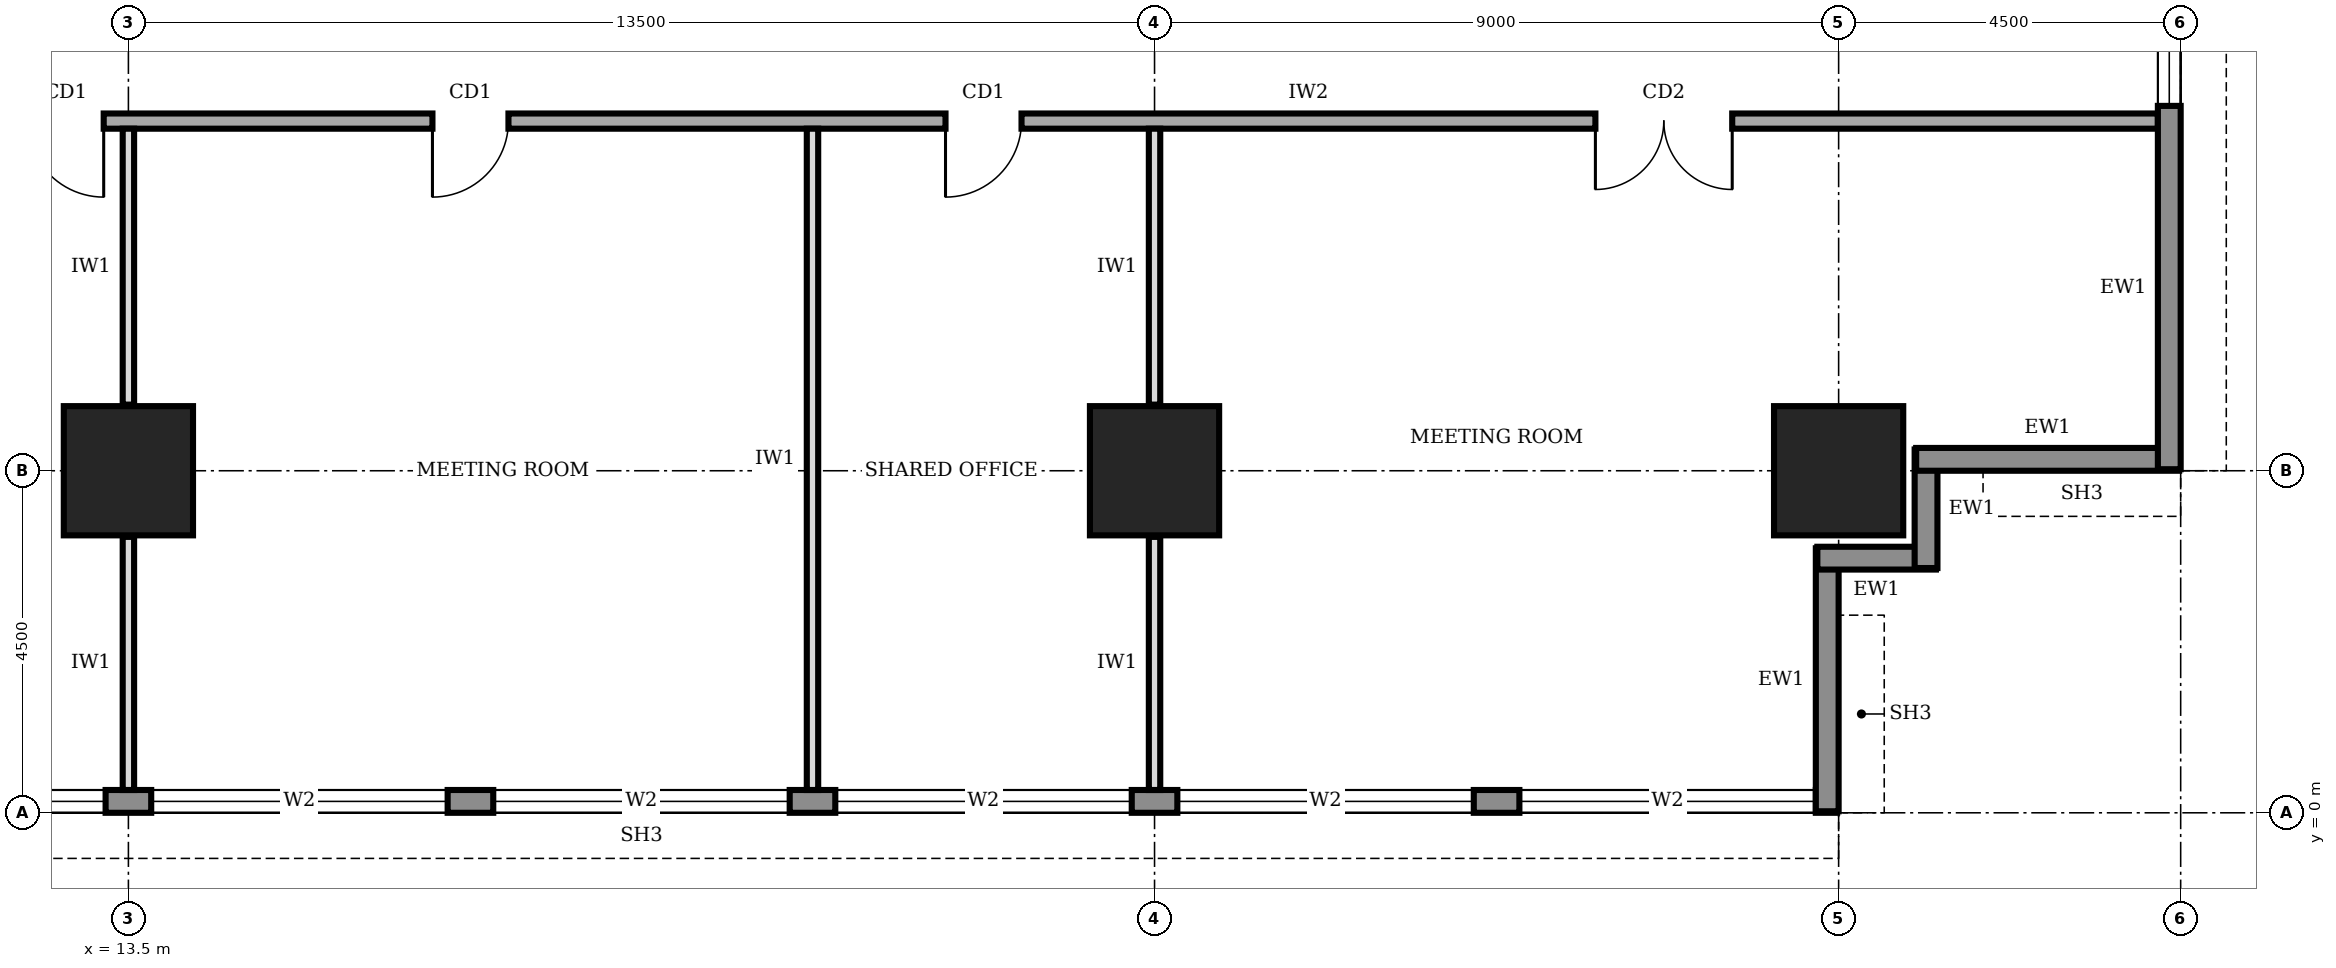
"""IFC4 building model, lengths in metres.
Left out: names, types, materials, properties, quantities, classifications, styles, units other than length and angle.
Written with IfcOpenShell. Run it as: python <this file> out.ifc"""

import sys

from ifc_helpers import new_model, si_unit, direction, frame, frame_2d, origin, origin_2d, place, context, subcontext, project, spatial, rectangle, extrude, element, fill, save


model = new_model("IFC4")
c1 = context("Model", 3, precision=1e-05, world=origin(), true_north=direction((0.0, 1.0)))
c2 = subcontext(c1, "Body", "Model", "MODEL_VIEW")
j1 = project(units=[si_unit("LENGTHUNIT", "METRE"), si_unit("PLANEANGLEUNIT", "RADIAN")], contexts=[c1])
p1 = place(None, origin())
s1 = spatial("IfcSite", under=j1, at=p1, CompositionType="ELEMENT")
p2 = place(p1, origin())
s2 = spatial("IfcBuilding", under=s1, at=p2, CompositionType="ELEMENT")
p3 = place(p2, frame((0.0, 0.0, 141.0)))
s3 = spatial("IfcBuildingStorey", under=s2, at=p3, CompositionType="ELEMENT", Elevation=141.0)
for number, where, z_axis, x_axis in (
    (1, (13.5, 4.5, 0.0), (0.0, 0.0, 1.0), (1.0, 0.0, 0.0)),
    (2, (27.0, 4.5, 0.0), (0.0, 0.0, 1.0), (1.0, 0.0, 0.0)),
    (3, (36.0, 4.5, 0.0), (0.0, 0.0, 1.0), (1.0, 0.0, 0.0)),
):
    element("IfcColumn", number, at=place(p3, frame(where, z_axis=z_axis, x_axis=x_axis)), inside=s3, PredefinedType="COLUMN", context=c2, shape_type="SweptSolid", body=[
        extrude(rectangle(XDim=1.7, YDim=1.7, at=origin_2d()), origin(), (0.0, 0.0, 1.0), 4.0),
    ])
p4 = place(p3, frame((4.52, 0.15, 0.0), z_axis=(0.0, 0.0, 1.0), x_axis=(1.0, 0.0, 0.0)))
e4 = element("IfcWall", 4, at=p4, inside=s3, PredefinedType="STANDARD", context=c2, shape_type="SweptSolid", body=[
    extrude(rectangle(XDim=31.46, YDim=0.3, at=frame_2d((15.73, 0.0))), origin(), (0.0, 0.0, 1.0), 3.75),
])
p5 = place(p4, frame((4.78, 0.0, 0.6)))
e5 = element("IfcOpeningElement", 5, at=p5, cuts=e4, PredefinedType="OPENING", context=c2, shape_type="SweptSolid", body=[
    extrude(rectangle(XDim=3.9, YDim=2.6, at=frame_2d((1.95, 1.3))), frame((0.0, 0.16, 0.0), z_axis=(0.0, -1.0, 0.0), x_axis=(1.0, 0.0, 0.0)), (0.0, 0.0, 1.0), 0.32),
])
p6 = place(p4, frame((9.28, 0.0, 0.6)))
e6 = element("IfcOpeningElement", 6, at=p6, cuts=e4, PredefinedType="OPENING", context=c2, shape_type="SweptSolid", body=[
    extrude(rectangle(XDim=3.9, YDim=2.6, at=frame_2d((1.95, 1.3))), frame((0.0, 0.16, 0.0), z_axis=(0.0, -1.0, 0.0), x_axis=(1.0, 0.0, 0.0)), (0.0, 0.0, 1.0), 0.32),
])
p7 = place(p4, frame((13.78, 0.0, 0.6)))
e7 = element("IfcOpeningElement", 7, at=p7, cuts=e4, PredefinedType="OPENING", context=c2, shape_type="SweptSolid", body=[
    extrude(rectangle(XDim=3.9, YDim=2.6, at=frame_2d((1.95, 1.3))), frame((0.0, 0.16, 0.0), z_axis=(0.0, -1.0, 0.0), x_axis=(1.0, 0.0, 0.0)), (0.0, 0.0, 1.0), 0.32),
])
p8 = place(p4, frame((18.28, 0.0, 0.6)))
e8 = element("IfcOpeningElement", 8, at=p8, cuts=e4, PredefinedType="OPENING", context=c2, shape_type="SweptSolid", body=[
    extrude(rectangle(XDim=3.9, YDim=2.6, at=frame_2d((1.95, 1.3))), frame((0.0, 0.16, 0.0), z_axis=(0.0, -1.0, 0.0), x_axis=(1.0, 0.0, 0.0)), (0.0, 0.0, 1.0), 0.32),
])
p9 = place(p4, frame((22.78, 0.0, 0.6)))
e9 = element("IfcOpeningElement", 9, at=p9, cuts=e4, PredefinedType="OPENING", context=c2, shape_type="SweptSolid", body=[
    extrude(rectangle(XDim=3.9, YDim=2.6, at=frame_2d((1.95, 1.3))), frame((0.0, 0.16, 0.0), z_axis=(0.0, -1.0, 0.0), x_axis=(1.0, 0.0, 0.0)), (0.0, 0.0, 1.0), 0.32),
])
p10 = place(p4, frame((27.28, 0.0, 0.6)))
e10 = element("IfcOpeningElement", 10, at=p10, cuts=e4, PredefinedType="OPENING", context=c2, shape_type="SweptSolid", body=[
    extrude(rectangle(XDim=3.9, YDim=2.6, at=frame_2d((1.95, 1.3))), frame((0.0, 0.16, 0.0), z_axis=(0.0, -1.0, 0.0), x_axis=(1.0, 0.0, 0.0)), (0.0, 0.0, 1.0), 0.32),
])
p11 = place(p3, frame((35.85, 0.02, 0.0), z_axis=(0.0, 0.0, 1.0), x_axis=(0.0, 1.0, 0.0)))
e11 = element("IfcWall", 11, at=p11, inside=s3, PredefinedType="STANDARD", context=c2, shape_type="SweptSolid", body=[
    extrude(rectangle(XDim=3.46, YDim=0.3, at=frame_2d((1.73, 0.0))), origin(), (0.0, 0.0, 1.0), 2.85),
])
for number, where, z_axis, x_axis in (
    (12, (35.72, 3.35, 0.0), (0.0, 0.0, 1.0), (1.0, 0.0, 0.0)),
    (13, (37.15, 3.22, 0.0), (0.0, 0.0, 1.0), (0.0, 1.0, 0.0)),
):
    element("IfcWall", number, at=place(p3, frame(where, z_axis=z_axis, x_axis=x_axis)), inside=s3, PredefinedType="STANDARD", context=c2, shape_type="SweptSolid", body=[
        extrude(rectangle(XDim=1.56, YDim=0.3, at=frame_2d((0.78, 0.0))), origin(), (0.0, 0.0, 1.0), 3.75),
    ])
p12 = place(p3, frame((37.02, 4.65, 0.0), z_axis=(0.0, 0.0, 1.0), x_axis=(1.0, 0.0, 0.0)))
e14 = element("IfcWall", 14, at=p12, inside=s3, PredefinedType="STANDARD", context=c2, shape_type="SweptSolid", body=[
    extrude(rectangle(XDim=3.46, YDim=0.3, at=frame_2d((1.73, 0.0))), origin(), (0.0, 0.0, 1.0), 2.85),
])
p13 = place(p3, frame((40.35, 4.52, 0.0), z_axis=(0.0, 0.0, 1.0), x_axis=(0.0, 1.0, 0.0)))
e15 = element("IfcWall", 15, at=p13, inside=s3, PredefinedType="STANDARD", context=c2, shape_type="SweptSolid", body=[
    extrude(rectangle(XDim=31.46, YDim=0.3, at=frame_2d((15.73, 0.0))), origin(), (0.0, 0.0, 1.0), 3.75),
])
p14 = place(p13, frame((4.78, 0.0, 0.6)))
e16 = element("IfcOpeningElement", 16, at=p14, cuts=e15, PredefinedType="OPENING", context=c2, shape_type="SweptSolid", body=[
    extrude(rectangle(XDim=3.9, YDim=2.6, at=frame_2d((1.95, 1.3))), frame((0.0, 0.16, 0.0), z_axis=(0.0, -1.0, 0.0), x_axis=(1.0, 0.0, 0.0)), (0.0, 0.0, 1.0), 0.32),
])
p15 = place(p13, frame((9.28, 0.0, 0.6)))
e17 = element("IfcOpeningElement", 17, at=p15, cuts=e15, PredefinedType="OPENING", context=c2, shape_type="SweptSolid", body=[
    extrude(rectangle(XDim=3.9, YDim=2.6, at=frame_2d((1.95, 1.3))), frame((0.0, 0.16, 0.0), z_axis=(0.0, -1.0, 0.0), x_axis=(1.0, 0.0, 0.0)), (0.0, 0.0, 1.0), 0.32),
])
p16 = place(p13, frame((13.78, 0.0, 0.6)))
e18 = element("IfcOpeningElement", 18, at=p16, cuts=e15, PredefinedType="OPENING", context=c2, shape_type="SweptSolid", body=[
    extrude(rectangle(XDim=3.9, YDim=2.6, at=frame_2d((1.95, 1.3))), frame((0.0, 0.16, 0.0), z_axis=(0.0, -1.0, 0.0), x_axis=(1.0, 0.0, 0.0)), (0.0, 0.0, 1.0), 0.32),
])
p17 = place(p13, frame((18.28, 0.0, 0.6)))
e19 = element("IfcOpeningElement", 19, at=p17, cuts=e15, PredefinedType="OPENING", context=c2, shape_type="SweptSolid", body=[
    extrude(rectangle(XDim=3.9, YDim=2.6, at=frame_2d((1.95, 1.3))), frame((0.0, 0.16, 0.0), z_axis=(0.0, -1.0, 0.0), x_axis=(1.0, 0.0, 0.0)), (0.0, 0.0, 1.0), 0.32),
])
p18 = place(p13, frame((22.78, 0.0, 0.6)))
e20 = element("IfcOpeningElement", 20, at=p18, cuts=e15, PredefinedType="OPENING", context=c2, shape_type="SweptSolid", body=[
    extrude(rectangle(XDim=3.9, YDim=2.6, at=frame_2d((1.95, 1.3))), frame((0.0, 0.16, 0.0), z_axis=(0.0, -1.0, 0.0), x_axis=(1.0, 0.0, 0.0)), (0.0, 0.0, 1.0), 0.32),
])
p19 = place(p13, frame((27.28, 0.0, 0.6)))
e21 = element("IfcOpeningElement", 21, at=p19, cuts=e15, PredefinedType="OPENING", context=c2, shape_type="SweptSolid", body=[
    extrude(rectangle(XDim=3.9, YDim=2.6, at=frame_2d((1.95, 1.3))), frame((0.0, 0.16, 0.0), z_axis=(0.0, -1.0, 0.0), x_axis=(1.0, 0.0, 0.0)), (0.0, 0.0, 1.0), 0.32),
])
p20 = place(p3, frame((11.9, 9.1, 0.0), z_axis=(0.0, 0.0, 1.0), x_axis=(1.0, 0.0, 0.0)))
e22 = element("IfcWall", 22, at=p20, inside=s3, PredefinedType="SOLIDWALL", context=c2, shape_type="SweptSolid", body=[
    extrude(rectangle(XDim=28.3, YDim=0.2, at=frame_2d((14.15, 0.0))), origin(), (0.0, 0.0, 1.0), 3.75),
])
p21 = place(p20, frame((0.275, 0.0, 0.0)))
e23 = element("IfcOpeningElement", 23, at=p21, cuts=e22, PredefinedType="OPENING", context=c2, shape_type="SweptSolid", body=[
    extrude(rectangle(XDim=1.0, YDim=2.1, at=frame_2d((0.5, 1.05))), frame((0.0, 0.11, 0.0), z_axis=(0.0, -1.0, 0.0), x_axis=(1.0, 0.0, 0.0)), (0.0, 0.0, 1.0), 0.22),
])
p22 = place(p20, frame((5.6, 0.0, 0.0)))
e24 = element("IfcOpeningElement", 24, at=p22, cuts=e22, PredefinedType="OPENING", context=c2, shape_type="SweptSolid", body=[
    extrude(rectangle(XDim=1.0, YDim=2.1, at=frame_2d((0.5, 1.05))), frame((0.0, 0.11, 0.0), z_axis=(0.0, -1.0, 0.0), x_axis=(1.0, 0.0, 0.0)), (0.0, 0.0, 1.0), 0.22),
])
p23 = place(p20, frame((12.35, 0.0, 0.0)))
e25 = element("IfcOpeningElement", 25, at=p23, cuts=e22, PredefinedType="OPENING", context=c2, shape_type="SweptSolid", body=[
    extrude(rectangle(XDim=1.0, YDim=2.1, at=frame_2d((0.5, 1.05))), frame((0.0, 0.11, 0.0), z_axis=(0.0, -1.0, 0.0), x_axis=(1.0, 0.0, 0.0)), (0.0, 0.0, 1.0), 0.22),
])
p24 = place(p20, frame((20.9, 0.0, 0.0)))
e26 = element("IfcOpeningElement", 26, at=p24, cuts=e22, PredefinedType="OPENING", context=c2, shape_type="SweptSolid", body=[
    extrude(rectangle(XDim=1.8, YDim=2.1, at=frame_2d((0.9, 1.05))), frame((0.0, 0.11, 0.0), z_axis=(0.0, -1.0, 0.0), x_axis=(1.0, 0.0, 0.0)), (0.0, 0.0, 1.0), 0.22),
])
p25 = place(p3, frame((13.5, 0.3, 0.0), z_axis=(0.0, 0.0, 1.0), x_axis=(0.0, 1.0, 0.0)))
e27 = element("IfcWall", 27, at=p25, inside=s3, PredefinedType="PARTITIONING", context=c2, shape_type="SweptSolid", body=[
    extrude(rectangle(XDim=3.33, YDim=0.15, at=frame_2d((1.665, 0.0))), origin(), (0.0, 0.0, 1.0), 2.85),
])
p26 = place(p3, frame((13.5, 5.37, 0.0), z_axis=(0.0, 0.0, 1.0), x_axis=(0.0, 1.0, 0.0)))
e28 = element("IfcWall", 28, at=p26, inside=s3, PredefinedType="PARTITIONING", context=c2, shape_type="SweptSolid", body=[
    extrude(rectangle(XDim=3.63, YDim=0.15, at=frame_2d((1.815, 0.0))), origin(), (0.0, 0.0, 1.0), 2.85),
])
p27 = place(p3, frame((22.5, 0.3, 0.0), z_axis=(0.0, 0.0, 1.0), x_axis=(0.0, 1.0, 0.0)))
e29 = element("IfcWall", 29, at=p27, inside=s3, PredefinedType="PARTITIONING", context=c2, shape_type="SweptSolid", body=[
    extrude(rectangle(XDim=8.7, YDim=0.15, at=frame_2d((4.35, 0.0))), origin(), (0.0, 0.0, 1.0), 3.75),
])
p28 = place(p3, frame((27.0, 0.3, 0.0), z_axis=(0.0, 0.0, 1.0), x_axis=(0.0, 1.0, 0.0)))
e30 = element("IfcWall", 30, at=p28, inside=s3, PredefinedType="PARTITIONING", context=c2, shape_type="SweptSolid", body=[
    extrude(rectangle(XDim=3.33, YDim=0.15, at=frame_2d((1.665, 0.0))), origin(), (0.0, 0.0, 1.0), 2.85),
])
p29 = place(p3, frame((27.0, 5.37, 0.0), z_axis=(0.0, 0.0, 1.0), x_axis=(0.0, 1.0, 0.0)))
e31 = element("IfcWall", 31, at=p29, inside=s3, PredefinedType="PARTITIONING", context=c2, shape_type="SweptSolid", body=[
    extrude(rectangle(XDim=3.63, YDim=0.15, at=frame_2d((1.815, 0.0))), origin(), (0.0, 0.0, 1.0), 2.85),
])
p30 = place(p5, origin())
e32 = element("IfcWindow", 32, at=p30, inside=s3, PartitioningType="SINGLE_PANEL", PredefinedType="WINDOW", context=c2, shape_type="SweptSolid", body=[
    extrude(rectangle(XDim=3.9, YDim=2.6, at=frame_2d((1.95, 1.3))), frame((0.0, 0.03, 0.0), z_axis=(0.0, -1.0, 0.0), x_axis=(1.0, 0.0, 0.0)), (0.0, 0.0, 1.0), 0.06),
])
fill(e5, e32)
p31 = place(p6, origin())
e33 = element("IfcWindow", 33, at=p31, inside=s3, PartitioningType="SINGLE_PANEL", PredefinedType="WINDOW", context=c2, shape_type="SweptSolid", body=[
    extrude(rectangle(XDim=3.9, YDim=2.6, at=frame_2d((1.95, 1.3))), frame((0.0, 0.03, 0.0), z_axis=(0.0, -1.0, 0.0), x_axis=(1.0, 0.0, 0.0)), (0.0, 0.0, 1.0), 0.06),
])
fill(e6, e33)
p32 = place(p7, origin())
e34 = element("IfcWindow", 34, at=p32, inside=s3, PartitioningType="SINGLE_PANEL", PredefinedType="WINDOW", context=c2, shape_type="SweptSolid", body=[
    extrude(rectangle(XDim=3.9, YDim=2.6, at=frame_2d((1.95, 1.3))), frame((0.0, 0.03, 0.0), z_axis=(0.0, -1.0, 0.0), x_axis=(1.0, 0.0, 0.0)), (0.0, 0.0, 1.0), 0.06),
])
fill(e7, e34)
p33 = place(p8, origin())
e35 = element("IfcWindow", 35, at=p33, inside=s3, PartitioningType="SINGLE_PANEL", PredefinedType="WINDOW", context=c2, shape_type="SweptSolid", body=[
    extrude(rectangle(XDim=3.9, YDim=2.6, at=frame_2d((1.95, 1.3))), frame((0.0, 0.03, 0.0), z_axis=(0.0, -1.0, 0.0), x_axis=(1.0, 0.0, 0.0)), (0.0, 0.0, 1.0), 0.06),
])
fill(e8, e35)
p34 = place(p9, origin())
e36 = element("IfcWindow", 36, at=p34, inside=s3, PartitioningType="SINGLE_PANEL", PredefinedType="WINDOW", context=c2, shape_type="SweptSolid", body=[
    extrude(rectangle(XDim=3.9, YDim=2.6, at=frame_2d((1.95, 1.3))), frame((0.0, 0.03, 0.0), z_axis=(0.0, -1.0, 0.0), x_axis=(1.0, 0.0, 0.0)), (0.0, 0.0, 1.0), 0.06),
])
fill(e9, e36)
p35 = place(p10, origin())
e37 = element("IfcWindow", 37, at=p35, inside=s3, PartitioningType="SINGLE_PANEL", PredefinedType="WINDOW", context=c2, shape_type="SweptSolid", body=[
    extrude(rectangle(XDim=3.9, YDim=2.6, at=frame_2d((1.95, 1.3))), frame((0.0, 0.03, 0.0), z_axis=(0.0, -1.0, 0.0), x_axis=(1.0, 0.0, 0.0)), (0.0, 0.0, 1.0), 0.06),
])
fill(e10, e37)
p36 = place(p14, origin())
e38 = element("IfcWindow", 38, at=p36, inside=s3, PartitioningType="SINGLE_PANEL", PredefinedType="WINDOW", context=c2, shape_type="SweptSolid", body=[
    extrude(rectangle(XDim=3.9, YDim=2.6, at=frame_2d((1.95, 1.3))), frame((0.0, 0.03, 0.0), z_axis=(0.0, -1.0, 0.0), x_axis=(1.0, 0.0, 0.0)), (0.0, 0.0, 1.0), 0.06),
])
fill(e16, e38)
p37 = place(p21, frame((1.0, 0.0, 0.0), z_axis=(0.0, 0.0, 1.0), x_axis=(-1.0, 0.0, 0.0)))
e39 = element("IfcDoor", 39, at=p37, inside=s3, OperationType="SINGLE_SWING_LEFT", PredefinedType="DOOR", context=c2, shape_type="SweptSolid", body=[
    extrude(rectangle(XDim=1.0, YDim=2.1, at=frame_2d((0.5, 1.05))), frame((0.0, 0.025, 0.0), z_axis=(0.0, -1.0, 0.0), x_axis=(1.0, 0.0, 0.0)), (0.0, 0.0, 1.0), 0.05),
])
fill(e23, e39)
p38 = place(p22, frame((1.0, 0.0, 0.0), z_axis=(0.0, 0.0, 1.0), x_axis=(-1.0, 0.0, 0.0)))
e40 = element("IfcDoor", 40, at=p38, inside=s3, OperationType="SINGLE_SWING_RIGHT", PredefinedType="DOOR", context=c2, shape_type="SweptSolid", body=[
    extrude(rectangle(XDim=1.0, YDim=2.1, at=frame_2d((0.5, 1.05))), frame((0.0, 0.025, 0.0), z_axis=(0.0, -1.0, 0.0), x_axis=(1.0, 0.0, 0.0)), (0.0, 0.0, 1.0), 0.05),
])
fill(e24, e40)
p39 = place(p23, frame((1.0, 0.0, 0.0), z_axis=(0.0, 0.0, 1.0), x_axis=(-1.0, 0.0, 0.0)))
e41 = element("IfcDoor", 41, at=p39, inside=s3, OperationType="SINGLE_SWING_RIGHT", PredefinedType="DOOR", context=c2, shape_type="SweptSolid", body=[
    extrude(rectangle(XDim=1.0, YDim=2.1, at=frame_2d((0.5, 1.05))), frame((0.0, 0.025, 0.0), z_axis=(0.0, -1.0, 0.0), x_axis=(1.0, 0.0, 0.0)), (0.0, 0.0, 1.0), 0.05),
])
fill(e25, e41)
p40 = place(p24, frame((1.8, 0.0, 0.0), z_axis=(0.0, 0.0, 1.0), x_axis=(-1.0, 0.0, 0.0)))
e42 = element("IfcDoor", 42, at=p40, inside=s3, OperationType="DOUBLE_DOOR_SINGLE_SWING", PredefinedType="DOOR", context=c2, shape_type="SweptSolid", body=[
    extrude(rectangle(XDim=1.8, YDim=2.1, at=frame_2d((0.9, 1.05))), frame((0.0, 0.025, 0.0), z_axis=(0.0, -1.0, 0.0), x_axis=(1.0, 0.0, 0.0)), (0.0, 0.0, 1.0), 0.05),
])
fill(e26, e42)
save(model, sys.argv[1])
